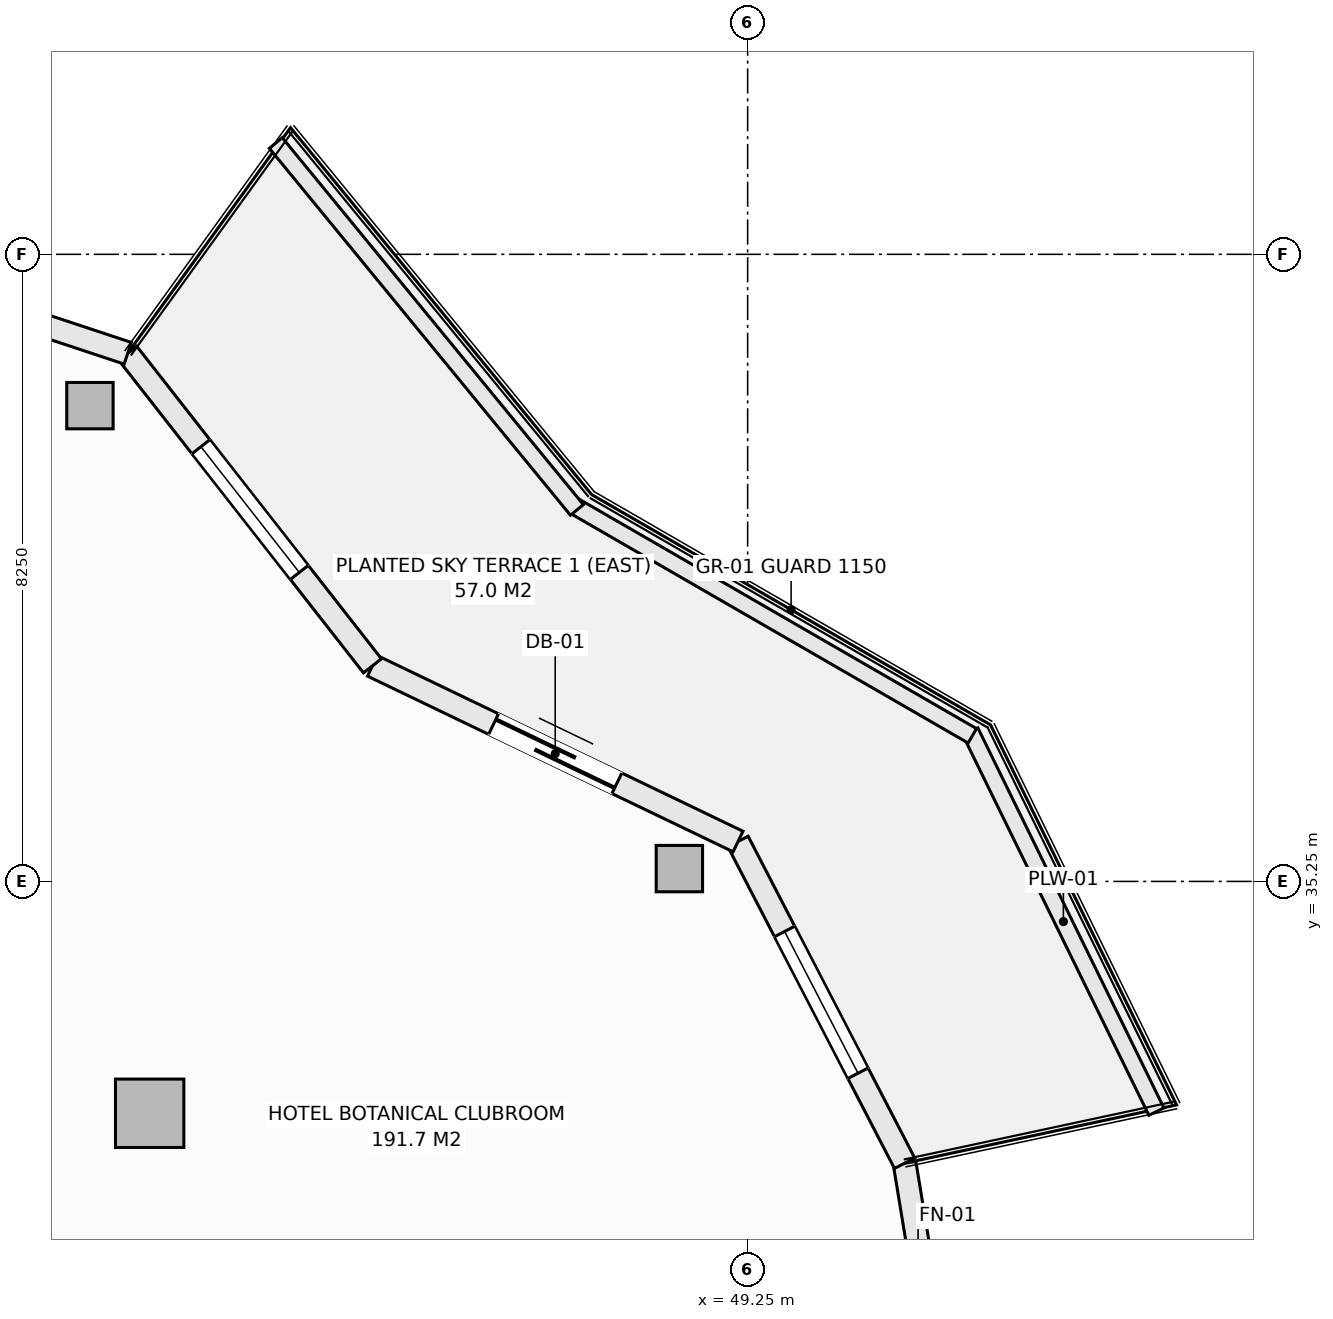
"""IFC4 building model, lengths in metres.
Left out: names, types, materials, properties, quantities, classifications, styles, units other than length and angle.
Written with IfcOpenShell. Run it as: python <this file> out.ifc"""

import sys

from ifc_helpers import new_model, si_unit, direction, frame, frame_2d, origin, origin_2d, place, context, subcontext, project, spatial, rectangle, hollow_rectangle, extrude, element, fill, save


model = new_model("IFC4")
c1 = context("Model", 3, precision=1e-05, world=origin(), true_north=direction((0.0, 1.0)))
c2 = subcontext(c1, "Body", "Model", "MODEL_VIEW")
j1 = project(units=[si_unit("LENGTHUNIT", "METRE"), si_unit("PLANEANGLEUNIT", "RADIAN")], contexts=[c1])
p1 = place(None, origin())
s1 = spatial("IfcSite", under=j1, at=p1, CompositionType="ELEMENT")
p2 = place(p1, origin())
s2 = spatial("IfcBuilding", under=s1, at=p2, CompositionType="ELEMENT")
p3 = place(p2, frame((0.0, 0.0, 152.9)))
s3 = spatial("IfcBuildingStorey", under=s2, at=p3, CompositionType="ELEMENT", Elevation=152.9)
for number, where, z_axis, x_axis in (
    (1, (48.352, 35.419, -0.27), (0.0, 0.0, 1.0), (1.0, 0.0, 0.0)),
    (2, (40.596, 41.51, -0.27), (0.0, 0.0, 1.0), (1.0, 0.0, 0.0)),
):
    element("IfcColumn", number, at=place(p3, frame(where, z_axis=z_axis, x_axis=x_axis)), inside=s3, PredefinedType="COLUMN", context=c2, shape_type="SweptSolid", body=[
        extrude(hollow_rectangle(XDim=0.61, YDim=0.61, WallThickness=0.025, at=origin_2d()), origin(), (0.0, 0.0, 1.0), 3.4),
    ])
p4 = place(p3, frame((41.382, 32.199, -0.27), z_axis=(0.0, 0.0, 1.0), x_axis=(1.0, 0.0, 0.0)))
e3 = element("IfcColumn", 3, at=p4, inside=s3, PredefinedType="COLUMN", context=c2, shape_type="SweptSolid", body=[
    extrude(rectangle(XDim=0.9, YDim=0.9, at=origin_2d()), origin(), (0.0, 0.0, 1.0), 3.4),
])
p5 = place(p3, frame((51.315, 31.542, 0.0), z_axis=(0.0, 0.0, 1.0), x_axis=(0.162394765401, -0.986725868806, 0.0)))
e4 = element("IfcWall", 4, at=p5, inside=s3, PredefinedType="SOLIDWALL", context=c2, shape_type="SweptSolid", body=[
    extrude(rectangle(XDim=4.603, YDim=0.3, at=frame_2d((2.302, 0.0))), origin(), (0.0, 0.0, 1.0), 2.653),
])
p6 = place(p5, frame((1.252, 0.0, 0.74)))
e5 = element("IfcOpeningElement", 5, at=p6, cuts=e4, PredefinedType="OPENING", context=c2, shape_type="SweptSolid", body=[
    extrude(rectangle(XDim=2.1, YDim=1.7, at=frame_2d((1.05, 0.85))), frame((0.0, 0.16, 0.0), z_axis=(0.0, -1.0, 0.0), x_axis=(1.0, 0.0, 0.0)), (0.0, 0.0, 1.0), 0.32),
])
p7 = place(p3, frame((49.123, 35.775, 0.0), z_axis=(0.0, 0.0, 1.0), x_axis=(0.459810251451, -0.888017191647, 0.0)))
e6 = element("IfcWall", 6, at=p7, inside=s3, PredefinedType="SOLIDWALL", context=c2, shape_type="SweptSolid", body=[
    extrude(rectangle(XDim=4.766, YDim=0.3, at=frame_2d((2.383, 0.0))), origin(), (0.0, 0.0, 1.0), 2.653),
])
p8 = place(p7, frame((1.333, 0.0, 0.74)))
e7 = element("IfcOpeningElement", 7, at=p8, cuts=e6, PredefinedType="OPENING", context=c2, shape_type="SweptSolid", body=[
    extrude(rectangle(XDim=2.1, YDim=1.7, at=frame_2d((1.05, 0.85))), frame((0.0, 0.16, 0.0), z_axis=(0.0, -1.0, 0.0), x_axis=(1.0, 0.0, 0.0)), (0.0, 0.0, 1.0), 0.32),
])
p9 = place(p3, frame((44.313, 38.086, 0.0), z_axis=(0.0, 0.0, 1.0), x_axis=(0.901353070301, -0.433085029363, 0.0)))
e8 = element("IfcWall", 8, at=p9, inside=s3, PredefinedType="SOLIDWALL", context=c2, shape_type="SweptSolid", body=[
    extrude(rectangle(XDim=5.336, YDim=0.3, at=frame_2d((2.668, 0.0))), origin(), (0.0, 0.0, 1.0), 2.653),
])
p10 = place(p9, frame((1.768, 0.0, 0.0)))
e9 = element("IfcOpeningElement", 9, at=p10, cuts=e8, PredefinedType="OPENING", context=c2, shape_type="SweptSolid", body=[
    extrude(rectangle(XDim=1.8, YDim=2.25, at=frame_2d((0.9, 1.125))), frame((0.0, 0.16, 0.0), z_axis=(0.0, -1.0, 0.0), x_axis=(1.0, 0.0, 0.0)), (0.0, 0.0, 1.0), 0.32),
])
p11 = place(p3, frame((41.094, 42.199, 0.0), z_axis=(0.0, 0.0, 1.0), x_axis=(0.616429245738, -0.787410302828, 0.0)))
e10 = element("IfcWall", 10, at=p11, inside=s3, PredefinedType="SOLIDWALL", context=c2, shape_type="SweptSolid", body=[
    extrude(rectangle(XDim=5.223, YDim=0.3, at=frame_2d((2.612, 0.0))), origin(), (0.0, 0.0, 1.0), 2.653),
])
p12 = place(p11, frame((1.562, 0.0, 0.74)))
e11 = element("IfcOpeningElement", 11, at=p12, cuts=e10, PredefinedType="OPENING", context=c2, shape_type="SweptSolid", body=[
    extrude(rectangle(XDim=2.1, YDim=1.7, at=frame_2d((1.05, 0.85))), frame((0.0, 0.16, 0.0), z_axis=(0.0, -1.0, 0.0), x_axis=(1.0, 0.0, 0.0)), (0.0, 0.0, 1.0), 0.32),
])
p13 = place(p3, frame((35.803, 43.952, 0.0), z_axis=(0.0, 0.0, 1.0), x_axis=(0.949246811547, -0.314532177636, 0.0)))
e12 = element("IfcWall", 12, at=p13, inside=s3, PredefinedType="SOLIDWALL", context=c2, shape_type="SweptSolid", body=[
    extrude(rectangle(XDim=5.574, YDim=0.3, at=frame_2d((2.787, 0.0))), origin(), (0.0, 0.0, 1.0), 2.653),
])
p14 = place(p13, frame((1.737, 0.0, 0.74)))
e13 = element("IfcOpeningElement", 13, at=p14, cuts=e12, PredefinedType="OPENING", context=c2, shape_type="SweptSolid", body=[
    extrude(rectangle(XDim=2.1, YDim=1.7, at=frame_2d((1.05, 0.85))), frame((0.0, 0.16, 0.0), z_axis=(0.0, -1.0, 0.0), x_axis=(1.0, 0.0, 0.0)), (0.0, 0.0, 1.0), 0.32),
])
p15 = place(p3, frame((52.18, 37.221, 0.0), z_axis=(0.0, 0.0, 1.0), x_axis=(0.439637174641, -0.898175458735, 0.0)))
e14 = element("IfcWall", 14, at=p15, inside=s3, PredefinedType="PARAPET", context=c2, shape_type="SweptSolid", body=[
    extrude(rectangle(XDim=5.567, YDim=0.22, at=frame_2d((2.784, 0.0))), origin(), (0.0, 0.0, 1.0), 0.52),
])
p16 = place(p3, frame((46.958, 40.195, 0.0), z_axis=(0.0, 0.0, 1.0), x_axis=(0.866058128659, -0.499943314571, 0.0)))
e15 = element("IfcWall", 15, at=p16, inside=s3, PredefinedType="PARAPET", context=c2, shape_type="SweptSolid", body=[
    extrude(rectangle(XDim=6.06, YDim=0.22, at=frame_2d((3.03, 0.0))), origin(), (0.0, 0.0, 1.0), 0.52),
])
p17 = place(p3, frame((43.042, 44.964, 0.0), z_axis=(0.0, 0.0, 1.0), x_axis=(0.634429234628, -0.77298094818, 0.0)))
e16 = element("IfcWall", 16, at=p17, inside=s3, PredefinedType="PARAPET", context=c2, shape_type="SweptSolid", body=[
    extrude(rectangle(XDim=6.245, YDim=0.22, at=frame_2d((3.123, 0.0))), origin(), (0.0, 0.0, 1.0), 0.52),
])
p18 = place(p8, origin())
e17 = element("IfcWindow", 17, at=p18, inside=s3, PartitioningType="SINGLE_PANEL", PredefinedType="WINDOW", context=c2, shape_type="SweptSolid", body=[
    extrude(rectangle(XDim=2.1, YDim=1.7, at=frame_2d((1.05, 0.85))), frame((0.0, 0.03, 0.0), z_axis=(0.0, -1.0, 0.0), x_axis=(1.0, 0.0, 0.0)), (0.0, 0.0, 1.0), 0.06),
])
fill(e7, e17)
p19 = place(p10, origin())
e18 = element("IfcDoor", 18, at=p19, inside=s3, OperationType="SLIDING_TO_LEFT", PredefinedType="DOOR", context=c2, shape_type="SweptSolid", body=[
    extrude(rectangle(XDim=1.8, YDim=2.25, at=frame_2d((0.9, 1.125))), frame((0.0, 0.025, 0.0), z_axis=(0.0, -1.0, 0.0), x_axis=(1.0, 0.0, 0.0)), (0.0, 0.0, 1.0), 0.05),
])
fill(e9, e18)
p20 = place(p12, origin())
e19 = element("IfcWindow", 19, at=p20, inside=s3, PartitioningType="SINGLE_PANEL", PredefinedType="WINDOW", context=c2, shape_type="SweptSolid", body=[
    extrude(rectangle(XDim=2.1, YDim=1.7, at=frame_2d((1.05, 0.85))), frame((0.0, 0.03, 0.0), z_axis=(0.0, -1.0, 0.0), x_axis=(1.0, 0.0, 0.0)), (0.0, 0.0, 1.0), 0.06),
])
fill(e11, e19)
save(model, sys.argv[1])
